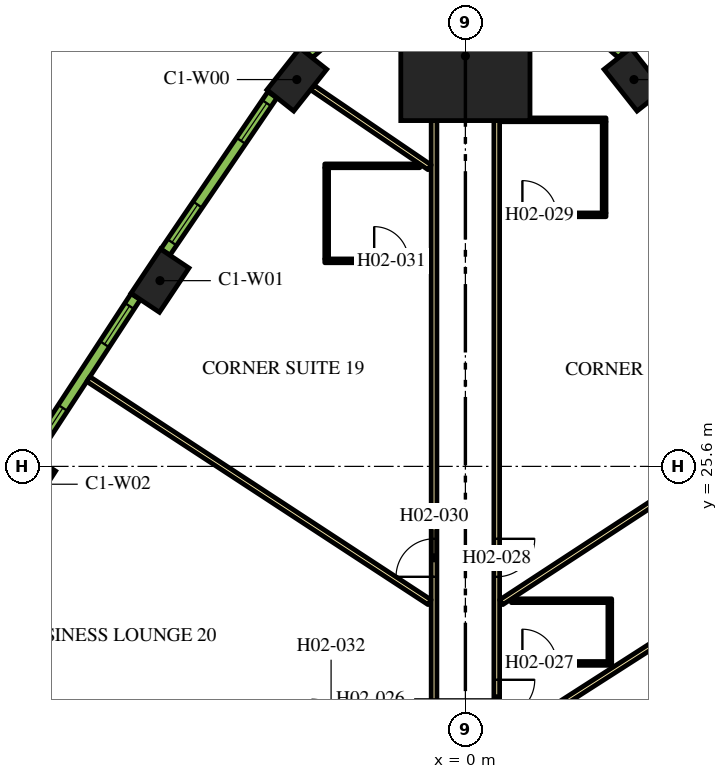
"""IFC4 building model, lengths in metres.
Left out: names, types, materials, properties, quantities, classifications, styles, units other than length and angle.
Written with IfcOpenShell. Run it as: python <this file> out.ifc"""

import sys

from ifc_helpers import new_model, si_unit, direction, frame, frame_2d, origin, origin_2d, place, context, subcontext, project, spatial, rectangle, extrude, element, fill, save


model = new_model("IFC4")
c1 = context("Model", 3, precision=1e-05, world=origin(), true_north=direction((0.0, 1.0)))
c2 = subcontext(c1, "Body", "Model", "MODEL_VIEW")
j1 = project(units=[si_unit("LENGTHUNIT", "METRE"), si_unit("PLANEANGLEUNIT", "RADIAN")], contexts=[c1])
p1 = place(None, origin())
s1 = spatial("IfcSite", under=j1, at=p1, CompositionType="ELEMENT")
p2 = place(p1, origin())
s2 = spatial("IfcBuilding", under=s1, at=p2, CompositionType="ELEMENT")
p3 = place(p2, frame((0.0, 0.0, 39.3)))
s3 = spatial("IfcBuildingStorey", under=s2, at=p3, CompositionType="ELEMENT", Elevation=39.3)
p4 = place(p3, frame((0.0, 36.399, 0.0), z_axis=(0.0, 0.0, 1.0), x_axis=(0.0, 1.0, 0.0)))
e1 = element("IfcColumn", 1, at=p4, inside=s3, PredefinedType="COLUMN", context=c2, shape_type="SweptSolid", body=[
    extrude(rectangle(XDim=3.4, YDim=3.4, at=origin_2d()), origin(), (0.0, 0.0, 1.0), 3.9),
])
for number, where, z_axis, x_axis in (
    (2, (4.436, 35.778, 0.0), (0.0, 0.0, 1.0), (-0.62, 0.784, 0.0)),
    (3, (-4.436, 35.778, 0.0), (0.0, 0.0, 1.0), (-0.62, -0.784, 0.0)),
    (4, (-8.037, 30.487, 0.0), (0.0, 0.0, 1.0), (-0.555, -0.832, 0.0)),
    (5, (-11.539, 25.131, 0.0), (0.0, 0.0, 1.0), (-0.539, -0.842, 0.0)),
):
    element("IfcColumn", number, at=place(p3, frame(where, z_axis=z_axis, x_axis=x_axis)), inside=s3, PredefinedType="COLUMN", context=c2, shape_type="SweptSolid", body=[
        extrude(rectangle(XDim=1.4, YDim=0.9, at=origin_2d()), origin(), (0.0, 0.0, 1.0), 3.9),
    ])
p5 = place(p3, frame((0.825, 34.699, 0.0), z_axis=(0.0, 0.0, 1.0), x_axis=(0.0, -1.0, 0.0)))
e6 = element("IfcWall", 6, at=p5, inside=s3, PredefinedType="PARTITIONING", context=c2, shape_type="SweptSolid", body=[
    extrude(rectangle(XDim=16.144, YDim=0.15, at=frame_2d((8.072, 0.0))), origin(), (0.0, 0.0, 1.0), 2.75),
])
p6 = place(p5, frame((14.714, 0.0, 0.0)))
e7 = element("IfcOpeningElement", 7, at=p6, cuts=e6, PredefinedType="OPENING", context=c2, shape_type="SweptSolid", body=[
    extrude(rectangle(XDim=1.0, YDim=2.1, at=frame_2d((0.5, 1.05))), frame((0.0, 0.085, 0.0), z_axis=(0.0, -1.0, 0.0), x_axis=(1.0, 0.0, 0.0)), (0.0, 0.0, 1.0), 0.17),
])
p7 = place(p5, frame((11.005, 0.0, 0.0)))
e8 = element("IfcOpeningElement", 8, at=p7, cuts=e6, PredefinedType="OPENING", context=c2, shape_type="SweptSolid", body=[
    extrude(rectangle(XDim=1.0, YDim=2.1, at=frame_2d((0.5, 1.05))), frame((0.0, 0.085, 0.0), z_axis=(0.0, -1.0, 0.0), x_axis=(1.0, 0.0, 0.0)), (0.0, 0.0, 1.0), 0.17),
])
p8 = place(p3, frame((-0.825, 18.475, 0.0), z_axis=(0.0, 0.0, 1.0), x_axis=(0.0, 1.0, 0.0)))
e9 = element("IfcWall", 9, at=p8, inside=s3, PredefinedType="PARTITIONING", context=c2, shape_type="SweptSolid", body=[
    extrude(rectangle(XDim=16.224, YDim=0.15, at=frame_2d((8.112, 0.0))), origin(), (0.0, 0.0, 1.0), 2.75),
])
p9 = place(p8, frame((4.22, 0.0, 0.0)))
e10 = element("IfcOpeningElement", 10, at=p9, cuts=e9, PredefinedType="OPENING", context=c2, shape_type="SweptSolid", body=[
    extrude(rectangle(XDim=1.0, YDim=2.1, at=frame_2d((0.5, 1.05))), frame((0.0, 0.085, 0.0), z_axis=(0.0, -1.0, 0.0), x_axis=(1.0, 0.0, 0.0)), (0.0, 0.0, 1.0), 0.17),
])
p10 = place(p3, frame((-14.558, 19.475, 0.0), z_axis=(0.0, 0.0, 1.0), x_axis=(0.851829455142, -0.523819223925, 0.0)))
e11 = element("IfcWall", 11, at=p10, inside=s3, PredefinedType="PARTITIONING", context=c2, shape_type="SweptSolid", body=[
    extrude(rectangle(XDim=7.688, YDim=0.15, at=frame_2d((3.844, 0.0))), origin(), (0.0, 0.0, 1.0), 2.75),
])
p11 = place(p3, frame((-9.922, 27.896, 0.0), z_axis=(0.0, 0.0, 1.0), x_axis=(0.836970816595, -0.547247523675, 0.0)))
e12 = element("IfcWall", 12, at=p11, inside=s3, PredefinedType="PARTITIONING", context=c2, shape_type="SweptSolid", body=[
    extrude(rectangle(XDim=10.729, YDim=0.15, at=frame_2d((5.364, 0.0))), origin(), (0.0, 0.0, 1.0), 2.75),
])
p12 = place(p3, frame((-4.028, 35.569, 0.0), z_axis=(0.0, 0.0, 1.0), x_axis=(0.826730622998, -0.562597971021, 0.0)))
e13 = element("IfcWall", 13, at=p12, inside=s3, PredefinedType="PARTITIONING", context=c2, shape_type="SweptSolid", body=[
    extrude(rectangle(XDim=3.733, YDim=0.15, at=frame_2d((1.867, 0.0))), origin(), (0.0, 0.0, 1.0), 2.75),
])
p13 = place(p3, frame((9.922, 27.896, 0.0), z_axis=(0.0, 0.0, 1.0), x_axis=(-0.836970816595, -0.547247523675, 0.0)))
e14 = element("IfcWall", 14, at=p13, inside=s3, PredefinedType="PARTITIONING", context=c2, shape_type="SweptSolid", body=[
    extrude(rectangle(XDim=10.729, YDim=0.15, at=frame_2d((5.364, 0.0))), origin(), (0.0, 0.0, 1.0), 2.75),
])
p14 = place(p3, frame((11.16, 24.888, 0.0), z_axis=(0.0, 0.0, 1.0), x_axis=(-0.84199813156, -0.539480441211, 0.0)))
e15 = element("IfcWall", 15, at=p14, inside=s3, PredefinedType="PARTITIONING", context=c2, shape_type="SweptSolid", body=[
    extrude(rectangle(XDim=11.638, YDim=0.15, at=frame_2d((5.819, 0.0))), origin(), (0.0, 0.0, 1.0), 2.75),
])
p15 = place(p3, frame((0.9, 20.416, 0.0), z_axis=(0.0, 0.0, 1.0), x_axis=(1.0, 0.0, 0.0)))
e16 = element("IfcWall", 16, at=p15, inside=s3, PredefinedType="PARTITIONING", context=c2, shape_type="SweptSolid", body=[
    extrude(rectangle(XDim=2.95, YDim=0.1, at=frame_2d((1.475, 0.0))), origin(), (0.0, 0.0, 1.0), 2.75),
])
p16 = place(p15, frame((0.6, 0.0, 0.0)))
e17 = element("IfcOpeningElement", 17, at=p16, cuts=e16, PredefinedType="OPENING", context=c2, shape_type="SweptSolid", body=[
    extrude(rectangle(XDim=0.9, YDim=2.1, at=frame_2d((0.45, 1.05))), frame((0.0, 0.06, 0.0), z_axis=(0.0, -1.0, 0.0), x_axis=(1.0, 0.0, 0.0)), (0.0, 0.0, 1.0), 0.12),
])
p17 = place(p3, frame((3.8, 20.466, 0.0), z_axis=(0.0, 0.0, 1.0), x_axis=(0.0, 1.0, 0.0)))
e18 = element("IfcWall", 18, at=p17, inside=s3, PredefinedType="PARTITIONING", context=c2, shape_type="SweptSolid", body=[
    extrude(rectangle(XDim=1.55, YDim=0.1, at=frame_2d((0.775, 0.0))), origin(), (0.0, 0.0, 1.0), 2.75),
])
p18 = place(p3, frame((1.21, 22.066, 0.0), z_axis=(0.0, 0.0, 1.0), x_axis=(1.0, 0.0, 0.0)))
e19 = element("IfcWall", 19, at=p18, inside=s3, PredefinedType="PARTITIONING", context=c2, shape_type="SweptSolid", body=[
    extrude(rectangle(XDim=2.64, YDim=0.1, at=frame_2d((1.32, 0.0))), origin(), (0.0, 0.0, 1.0), 2.75),
])
p19 = place(p3, frame((0.9, 32.219, 0.0), z_axis=(0.0, 0.0, 1.0), x_axis=(1.0, 0.0, 0.0)))
e20 = element("IfcWall", 20, at=p19, inside=s3, PredefinedType="PARTITIONING", context=c2, shape_type="SweptSolid", body=[
    extrude(rectangle(XDim=2.8, YDim=0.1, at=frame_2d((1.4, 0.0))), origin(), (0.0, 0.0, 1.0), 2.75),
])
p20 = place(p19, frame((0.6, 0.0, 0.0)))
e21 = element("IfcOpeningElement", 21, at=p20, cuts=e20, PredefinedType="OPENING", context=c2, shape_type="SweptSolid", body=[
    extrude(rectangle(XDim=0.9, YDim=2.1, at=frame_2d((0.45, 1.05))), frame((0.0, 0.06, 0.0), z_axis=(0.0, -1.0, 0.0), x_axis=(1.0, 0.0, 0.0)), (0.0, 0.0, 1.0), 0.12),
])
p21 = place(p3, frame((3.65, 32.269, 0.0), z_axis=(0.0, 0.0, 1.0), x_axis=(0.0, 1.0, 0.0)))
e22 = element("IfcWall", 22, at=p21, inside=s3, PredefinedType="PARTITIONING", context=c2, shape_type="SweptSolid", body=[
    extrude(rectangle(XDim=2.4, YDim=0.1, at=frame_2d((1.2, 0.0))), origin(), (0.0, 0.0, 1.0), 2.75),
])
p22 = place(p3, frame((0.9, 34.719, 0.0), z_axis=(0.0, 0.0, 1.0), x_axis=(1.0, 0.0, 0.0)))
e23 = element("IfcWall", 23, at=p22, inside=s3, PredefinedType="PARTITIONING", context=c2, shape_type="SweptSolid", body=[
    extrude(rectangle(XDim=2.8, YDim=0.1, at=frame_2d((1.4, 0.0))), origin(), (0.0, 0.0, 1.0), 2.75),
])
p23 = place(p3, frame((-3.7, 31.009, 0.0), z_axis=(0.0, 0.0, 1.0), x_axis=(1.0, 0.0, 0.0)))
e24 = element("IfcWall", 24, at=p23, inside=s3, PredefinedType="PARTITIONING", context=c2, shape_type="SweptSolid", body=[
    extrude(rectangle(XDim=2.8, YDim=0.1, at=frame_2d((1.4, 0.0))), origin(), (0.0, 0.0, 1.0), 2.75),
])
p24 = place(p23, frame((1.3, 0.0, 0.0)))
e25 = element("IfcOpeningElement", 25, at=p24, cuts=e24, PredefinedType="OPENING", context=c2, shape_type="SweptSolid", body=[
    extrude(rectangle(XDim=0.9, YDim=2.1, at=frame_2d((0.45, 1.05))), frame((0.0, 0.06, 0.0), z_axis=(0.0, -1.0, 0.0), x_axis=(1.0, 0.0, 0.0)), (0.0, 0.0, 1.0), 0.12),
])
p25 = place(p3, frame((-3.65, 31.059, 0.0), z_axis=(0.0, 0.0, 1.0), x_axis=(0.0, 1.0, 0.0)))
e26 = element("IfcWall", 26, at=p25, inside=s3, PredefinedType="PARTITIONING", context=c2, shape_type="SweptSolid", body=[
    extrude(rectangle(XDim=2.4, YDim=0.1, at=frame_2d((1.2, 0.0))), origin(), (0.0, 0.0, 1.0), 2.75),
])
p26 = place(p3, frame((-1.2, 33.509, 0.0), z_axis=(0.0, 0.0, 1.0), x_axis=(-1.0, 0.0, 0.0)))
e27 = element("IfcWall", 27, at=p26, inside=s3, PredefinedType="PARTITIONING", context=c2, shape_type="SweptSolid", body=[
    extrude(rectangle(XDim=2.5, YDim=0.1, at=frame_2d((1.25, 0.0))), origin(), (0.0, 0.0, 1.0), 2.75),
])
p27 = place(p3, frame((4.125, 36.459, 0.0), z_axis=(0.0, 0.0, 1.0), x_axis=(-0.749812680302, 0.661650167731, 0.0)))
e28 = element("IfcWall", 28, at=p27, inside=s3, PredefinedType="SOLIDWALL", context=c2, shape_type="SweptSolid", body=[
    extrude(rectangle(XDim=1.415, YDim=0.29, at=frame_2d((0.708, 0.0))), origin(), (0.0, 0.0, 1.0), 3.65),
])
p28 = place(p27, frame((0.258, 0.0, 0.9)))
e29 = element("IfcOpeningElement", 29, at=p28, cuts=e28, PredefinedType="OPENING", context=c2, shape_type="SweptSolid", body=[
    extrude(rectangle(XDim=0.9, YDim=2.15, at=frame_2d((0.45, 1.075))), frame((0.0, 0.155, 0.0), z_axis=(0.0, -1.0, 0.0), x_axis=(1.0, 0.0, 0.0)), (0.0, 0.0, 1.0), 0.31),
])
p29 = place(p3, frame((-3.064, 37.395, 0.0), z_axis=(0.0, 0.0, 1.0), x_axis=(-0.749812680302, -0.661650167731, 0.0)))
e30 = element("IfcWall", 30, at=p29, inside=s3, PredefinedType="SOLIDWALL", context=c2, shape_type="SweptSolid", body=[
    extrude(rectangle(XDim=1.415, YDim=0.29, at=frame_2d((0.708, 0.0))), origin(), (0.0, 0.0, 1.0), 3.65),
])
p30 = place(p29, frame((0.258, 0.0, 0.9)))
e31 = element("IfcOpeningElement", 31, at=p30, cuts=e30, PredefinedType="OPENING", context=c2, shape_type="SweptSolid", body=[
    extrude(rectangle(XDim=0.9, YDim=2.15, at=frame_2d((0.45, 1.075))), frame((0.0, 0.155, 0.0), z_axis=(0.0, -1.0, 0.0), x_axis=(1.0, 0.0, 0.0)), (0.0, 0.0, 1.0), 0.31),
])
p31 = place(p3, frame((-5.078, 35.376, 0.0), z_axis=(0.0, 0.0, 1.0), x_axis=(-0.562610153679, -0.826722332454, 0.0)))
e32 = element("IfcWall", 32, at=p31, inside=s3, PredefinedType="SOLIDWALL", context=c2, shape_type="SweptSolid", body=[
    extrude(rectangle(XDim=5.006, YDim=0.29, at=frame_2d((2.503, 0.0))), origin(), (0.0, 0.0, 1.0), 3.65),
])
p32 = place(p31, frame((0.265, 0.0, 0.9)))
e33 = element("IfcOpeningElement", 33, at=p32, cuts=e32, PredefinedType="OPENING", context=c2, shape_type="SweptSolid", body=[
    extrude(rectangle(XDim=1.2, YDim=2.15, at=frame_2d((0.6, 1.075))), frame((0.0, 0.155, 0.0), z_axis=(0.0, -1.0, 0.0), x_axis=(1.0, 0.0, 0.0)), (0.0, 0.0, 1.0), 0.31),
])
p33 = place(p31, frame((3.495, 0.0, 0.9)))
e34 = element("IfcOpeningElement", 34, at=p33, cuts=e32, PredefinedType="OPENING", context=c2, shape_type="SweptSolid", body=[
    extrude(rectangle(XDim=1.2, YDim=2.15, at=frame_2d((0.6, 1.075))), frame((0.0, 0.155, 0.0), z_axis=(0.0, -1.0, 0.0), x_axis=(1.0, 0.0, 0.0)), (0.0, 0.0, 1.0), 0.31),
])
p34 = place(p3, frame((-8.676, 30.068, 0.0), z_axis=(0.0, 0.0, 1.0), x_axis=(-0.547204617628, -0.836998868845, 0.0)))
e35 = element("IfcWall", 35, at=p34, inside=s3, PredefinedType="SOLIDWALL", context=c2, shape_type="SweptSolid", body=[
    extrude(rectangle(XDim=4.998, YDim=0.29, at=frame_2d((2.499, 0.0))), origin(), (0.0, 0.0, 1.0), 3.65),
])
p35 = place(p34, frame((0.297, 0.0, 0.9)))
e36 = element("IfcOpeningElement", 36, at=p35, cuts=e35, PredefinedType="OPENING", context=c2, shape_type="SweptSolid", body=[
    extrude(rectangle(XDim=1.2, YDim=2.15, at=frame_2d((0.6, 1.075))), frame((0.0, 0.155, 0.0), z_axis=(0.0, -1.0, 0.0), x_axis=(1.0, 0.0, 0.0)), (0.0, 0.0, 1.0), 0.31),
])
p36 = place(p34, frame((3.501, 0.0, 0.9)))
e37 = element("IfcOpeningElement", 37, at=p36, cuts=e35, PredefinedType="OPENING", context=c2, shape_type="SweptSolid", body=[
    extrude(rectangle(XDim=1.2, YDim=2.15, at=frame_2d((0.6, 1.075))), frame((0.0, 0.155, 0.0), z_axis=(0.0, -1.0, 0.0), x_axis=(1.0, 0.0, 0.0)), (0.0, 0.0, 1.0), 0.31),
])
p37 = place(p6, origin())
e38 = element("IfcDoor", 38, at=p37, inside=s3, OperationType="SINGLE_SWING_RIGHT", PredefinedType="DOOR", context=c2, shape_type="SweptSolid", body=[
    extrude(rectangle(XDim=1.0, YDim=2.1, at=frame_2d((0.5, 1.05))), frame((0.0, 0.025, 0.0), z_axis=(0.0, -1.0, 0.0), x_axis=(1.0, 0.0, 0.0)), (0.0, 0.0, 1.0), 0.05),
])
fill(e7, e38)
p38 = place(p16, origin())
e39 = element("IfcDoor", 39, at=p38, inside=s3, OperationType="SINGLE_SWING_LEFT", PredefinedType="DOOR", context=c2, shape_type="SweptSolid", body=[
    extrude(rectangle(XDim=0.9, YDim=2.1, at=frame_2d((0.45, 1.05))), frame((0.0, 0.025, 0.0), z_axis=(0.0, -1.0, 0.0), x_axis=(1.0, 0.0, 0.0)), (0.0, 0.0, 1.0), 0.05),
])
fill(e17, e39)
p39 = place(p7, origin())
e40 = element("IfcDoor", 40, at=p39, inside=s3, OperationType="SINGLE_SWING_RIGHT", PredefinedType="DOOR", context=c2, shape_type="SweptSolid", body=[
    extrude(rectangle(XDim=1.0, YDim=2.1, at=frame_2d((0.5, 1.05))), frame((0.0, 0.025, 0.0), z_axis=(0.0, -1.0, 0.0), x_axis=(1.0, 0.0, 0.0)), (0.0, 0.0, 1.0), 0.05),
])
fill(e8, e40)
p40 = place(p20, origin())
e41 = element("IfcDoor", 41, at=p40, inside=s3, OperationType="SINGLE_SWING_RIGHT", PredefinedType="DOOR", context=c2, shape_type="SweptSolid", body=[
    extrude(rectangle(XDim=0.9, YDim=2.1, at=frame_2d((0.45, 1.05))), frame((0.0, 0.025, 0.0), z_axis=(0.0, -1.0, 0.0), x_axis=(1.0, 0.0, 0.0)), (0.0, 0.0, 1.0), 0.05),
])
fill(e21, e41)
p41 = place(p9, origin())
e42 = element("IfcDoor", 42, at=p41, inside=s3, OperationType="SINGLE_SWING_LEFT", PredefinedType="DOOR", context=c2, shape_type="SweptSolid", body=[
    extrude(rectangle(XDim=1.0, YDim=2.1, at=frame_2d((0.5, 1.05))), frame((0.0, 0.025, 0.0), z_axis=(0.0, -1.0, 0.0), x_axis=(1.0, 0.0, 0.0)), (0.0, 0.0, 1.0), 0.05),
])
fill(e10, e42)
p42 = place(p24, origin())
e43 = element("IfcDoor", 43, at=p42, inside=s3, OperationType="SINGLE_SWING_LEFT", PredefinedType="DOOR", context=c2, shape_type="SweptSolid", body=[
    extrude(rectangle(XDim=0.9, YDim=2.1, at=frame_2d((0.45, 1.05))), frame((0.0, 0.025, 0.0), z_axis=(0.0, -1.0, 0.0), x_axis=(1.0, 0.0, 0.0)), (0.0, 0.0, 1.0), 0.05),
])
fill(e25, e43)
p43 = place(p32, origin())
e44 = element("IfcWindow", 44, at=p43, inside=s3, PartitioningType="DOUBLE_PANEL_VERTICAL", PredefinedType="WINDOW", context=c2, shape_type="SweptSolid", body=[
    extrude(rectangle(XDim=1.2, YDim=2.15, at=frame_2d((0.6, 1.075))), frame((0.0, 0.015, 0.0), z_axis=(0.0, -1.0, 0.0), x_axis=(1.0, 0.0, 0.0)), (0.0, 0.0, 1.0), 0.06),
])
fill(e33, e44)
p44 = place(p33, origin())
e45 = element("IfcWindow", 45, at=p44, inside=s3, PartitioningType="DOUBLE_PANEL_VERTICAL", PredefinedType="WINDOW", context=c2, shape_type="SweptSolid", body=[
    extrude(rectangle(XDim=1.2, YDim=2.15, at=frame_2d((0.6, 1.075))), frame((0.0, 0.015, 0.0), z_axis=(0.0, -1.0, 0.0), x_axis=(1.0, 0.0, 0.0)), (0.0, 0.0, 1.0), 0.06),
])
fill(e34, e45)
p45 = place(p35, origin())
e46 = element("IfcWindow", 46, at=p45, inside=s3, PartitioningType="DOUBLE_PANEL_VERTICAL", PredefinedType="WINDOW", context=c2, shape_type="SweptSolid", body=[
    extrude(rectangle(XDim=1.2, YDim=2.15, at=frame_2d((0.6, 1.075))), frame((0.0, 0.015, 0.0), z_axis=(0.0, -1.0, 0.0), x_axis=(1.0, 0.0, 0.0)), (0.0, 0.0, 1.0), 0.06),
])
fill(e36, e46)
p46 = place(p36, origin())
e47 = element("IfcWindow", 47, at=p46, inside=s3, PartitioningType="DOUBLE_PANEL_VERTICAL", PredefinedType="WINDOW", context=c2, shape_type="SweptSolid", body=[
    extrude(rectangle(XDim=1.2, YDim=2.15, at=frame_2d((0.6, 1.075))), frame((0.0, 0.015, 0.0), z_axis=(0.0, -1.0, 0.0), x_axis=(1.0, 0.0, 0.0)), (0.0, 0.0, 1.0), 0.06),
])
fill(e37, e47)
save(model, sys.argv[1])
